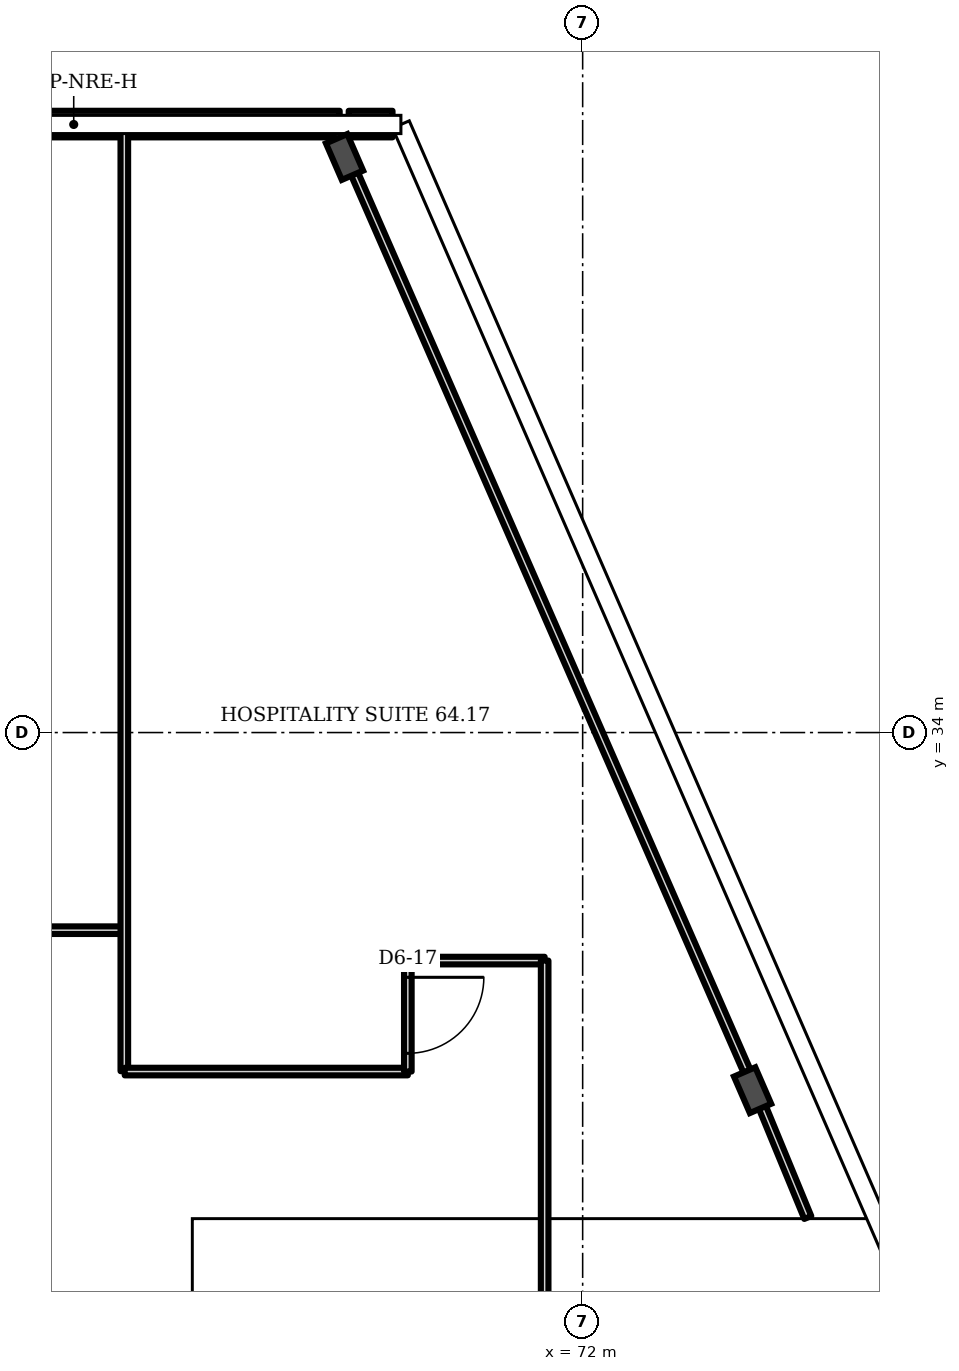
"""IFC4 building model, lengths in metres.
Left out: names, types, materials, properties, quantities, classifications, styles, units other than length and angle.
Written with IfcOpenShell. Run it as: python <this file> out.ifc"""

import sys

from ifc_helpers import new_model, si_unit, direction, frame, frame_2d, origin, origin_2d, place, context, subcontext, project, spatial, rectangle, i_section, extrude, element, fill, save


model = new_model("IFC4")
c1 = context("Model", 3, precision=1e-05, world=origin(), true_north=direction((0.0, 1.0)))
c2 = subcontext(c1, "Body", "Model", "MODEL_VIEW")
j1 = project(units=[si_unit("LENGTHUNIT", "METRE"), si_unit("PLANEANGLEUNIT", "RADIAN")], contexts=[c1])
p1 = place(None, origin())
s1 = spatial("IfcSite", under=j1, at=p1, CompositionType="ELEMENT")
p2 = place(p1, origin())
s2 = spatial("IfcBuilding", under=s1, at=p2, CompositionType="ELEMENT")
p3 = place(p2, frame((0.0, 0.0, 253.9)))
s3 = spatial("IfcBuildingStorey", under=s2, at=p3, CompositionType="ELEMENT", Elevation=253.9)
for number, where, z_axis, x_axis in (
    (1, (74.235, 29.295, 0.0), (0.0, 0.0, 1.0), (0.917, 0.399, 0.0)),
    (2, (68.867, 41.572, 0.0), (0.0, 0.0, 1.0), (0.917, 0.399, 0.0)),
):
    element("IfcColumn", number, at=place(p3, frame(where, z_axis=z_axis, x_axis=x_axis)), inside=s3, PredefinedType="COLUMN", context=c2, shape_type="SweptSolid", body=[
        extrude(i_section(OverallWidth=0.306, OverallDepth=0.524, WebThickness=0.021, FlangeThickness=0.04, FilletRadius=0.027, at=origin_2d()), origin(), (0.0, 0.0, 1.0), 3.6),
    ])
p4 = place(p3, frame((69.499, 42.005, 0.0), z_axis=(0.0, 0.0, 1.0), x_axis=(-1.0, 0.0, 0.0)))
e3 = element("IfcWall", 3, at=p4, inside=s3, PredefinedType="SOLIDWALL", context=c2, shape_type="SweptSolid", body=[
    extrude(rectangle(XDim=0.577, YDim=0.35, at=frame_2d((0.288, 0.0))), origin(), (0.0, 0.0, 1.0), 1.0),
])
p5 = place(p3, frame((68.803, 42.005, 0.0), z_axis=(0.0, 0.0, 1.0), x_axis=(-1.0, 0.0, 0.0)))
e4 = element("IfcWall", 4, at=p5, inside=s3, PredefinedType="SOLIDWALL", context=c2, shape_type="SweptSolid", body=[
    extrude(rectangle(XDim=7.803, YDim=0.35, at=frame_2d((3.902, 0.0))), origin(), (0.0, 0.0, 1.0), 1.0),
])
p6 = place(p3, frame((58.0, 31.4, 0.0), z_axis=(0.0, 0.0, 1.0), x_axis=(1.0, 0.0, 0.0)))
e5 = element("IfcWall", 5, at=p6, inside=s3, PredefinedType="PARTITIONING", context=c2, shape_type="SweptSolid", body=[
    extrude(rectangle(XDim=7.97, YDim=0.1, at=frame_2d((3.985, 0.0))), origin(), (0.0, 0.0, 1.0), 3.2),
])
p7 = place(p6, frame((2.15, 0.0, 0.0)))
e6 = element("IfcOpeningElement", 6, at=p7, cuts=e5, PredefinedType="OPENING", context=c2, shape_type="SweptSolid", body=[
    extrude(rectangle(XDim=1.0, YDim=2.1, at=frame_2d((0.5, 1.05))), frame((0.0, 0.06, 0.0), z_axis=(0.0, -1.0, 0.0), x_axis=(1.0, 0.0, 0.0)), (0.0, 0.0, 1.0), 0.12),
])
p8 = place(p3, frame((65.97, 29.545, 0.0), z_axis=(0.0, 0.0, 1.0), x_axis=(0.0, 1.0, 0.0)))
e7 = element("IfcWall", 7, at=p8, inside=s3, PredefinedType="PARTITIONING", context=c2, shape_type="SweptSolid", body=[
    extrude(rectangle(XDim=12.435, YDim=0.1, at=frame_2d((6.218, 0.0))), origin(), (0.0, 0.0, 1.0), 3.2),
])
p9 = place(p3, frame((65.975, 29.54, 0.0), z_axis=(0.0, 0.0, 1.0), x_axis=(1.0, 0.0, 0.0)))
e8 = element("IfcWall", 8, at=p9, inside=s3, PredefinedType="PARTITIONING", context=c2, shape_type="SweptSolid", body=[
    extrude(rectangle(XDim=3.725, YDim=0.1, at=frame_2d((1.862, 0.0))), origin(), (0.0, 0.0, 1.0), 3.2),
])
p10 = place(p3, frame((69.7, 29.54, 0.0), z_axis=(0.0, 0.0, 1.0), x_axis=(0.0, 1.0, 0.0)))
e9 = element("IfcWall", 9, at=p10, inside=s3, PredefinedType="PARTITIONING", context=c2, shape_type="SweptSolid", body=[
    extrude(rectangle(XDim=1.46, YDim=0.1, at=frame_2d((0.73, 0.0))), origin(), (0.0, 0.0, 1.0), 3.2),
])
p11 = place(p10, frame((0.24, 0.0, 0.0)))
e10 = element("IfcOpeningElement", 10, at=p11, cuts=e9, PredefinedType="OPENING", context=c2, shape_type="SweptSolid", body=[
    extrude(rectangle(XDim=1.0, YDim=2.1, at=frame_2d((0.5, 1.05))), frame((0.0, 0.06, 0.0), z_axis=(0.0, -1.0, 0.0), x_axis=(1.0, 0.0, 0.0)), (0.0, 0.0, 1.0), 0.12),
])
p12 = place(p3, frame((69.7, 31.0, 0.0), z_axis=(0.0, 0.0, 1.0), x_axis=(1.0, 0.0, 0.0)))
e11 = element("IfcWall", 11, at=p12, inside=s3, PredefinedType="PARTITIONING", context=c2, shape_type="SweptSolid", body=[
    extrude(rectangle(XDim=1.8, YDim=0.1, at=frame_2d((0.9, 0.0))), origin(), (0.0, 0.0, 1.0), 3.2),
])
p13 = place(p3, frame((71.5, 26.125, 0.0), z_axis=(0.0, 0.0, 1.0), x_axis=(0.0, 1.0, 0.0)))
e12 = element("IfcWall", 12, at=p13, inside=s3, PredefinedType="PARTITIONING", context=c2, shape_type="SweptSolid", body=[
    extrude(rectangle(XDim=4.875, YDim=0.1, at=frame_2d((2.438, 0.0))), origin(), (0.0, 0.0, 1.0), 3.2),
])
p14 = place(p3, frame((74.265, 29.31, 0.0), z_axis=(0.0, 0.0, 1.0), x_axis=(-0.400709, 0.916209, 0.0)))
e13 = element("IfcWall", 13, at=p14, inside=s3, PredefinedType="PARTITIONING", context=c2, shape_type="SweptSolid", body=[
    extrude(rectangle(XDim=13.829, YDim=0.1, at=frame_2d((6.914, 0.0))), origin(), (0.0, 0.0, 1.0), 2.58),
])
p15 = place(p3, frame((74.962, 27.62, 0.0), z_axis=(0.0, 0.0, 1.0), x_axis=(-0.381293, 0.924452, 0.0)))
e14 = element("IfcWall", 14, at=p15, inside=s3, PredefinedType="PARTITIONING", context=c2, shape_type="SweptSolid", body=[
    extrude(rectangle(XDim=1.828, YDim=0.1, at=frame_2d((0.914, 0.0))), origin(), (0.0, 0.0, 1.0), 2.58),
])
p16 = place(p11, origin())
e15 = element("IfcDoor", 15, at=p16, inside=s3, OperationType="SINGLE_SWING_RIGHT", PredefinedType="DOOR", context=c2, shape_type="SweptSolid", body=[
    extrude(rectangle(XDim=1.0, YDim=2.1, at=frame_2d((0.5, 1.05))), frame((0.0, 0.025, 0.0), z_axis=(0.0, -1.0, 0.0), x_axis=(1.0, 0.0, 0.0)), (0.0, 0.0, 1.0), 0.05),
])
fill(e10, e15)
save(model, sys.argv[1])
